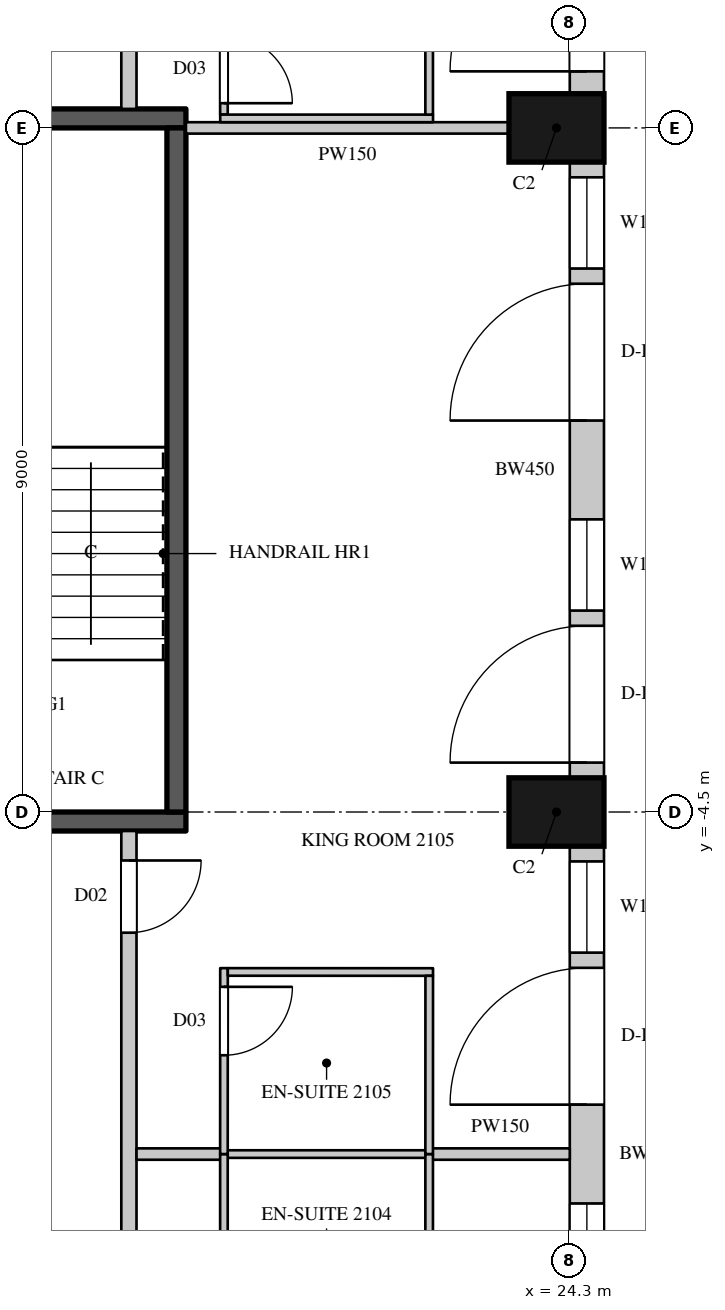
"""IFC4 building model, lengths in metres.
Left out: names, types, materials, properties, quantities, classifications, styles, units other than length and angle.
Written with IfcOpenShell. Run it as: python <this file> out.ifc"""

import sys

from ifc_helpers import new_model, si_unit, direction, frame, frame_2d, origin, origin_2d, place, context, subcontext, project, spatial, rectangle, extrude, element, fill, save


model = new_model("IFC4")
c1 = context("Model", 3, precision=1e-05, world=origin(), true_north=direction((0.0, 1.0)))
c2 = subcontext(c1, "Body", "Model", "MODEL_VIEW")
j1 = project(units=[si_unit("LENGTHUNIT", "METRE"), si_unit("PLANEANGLEUNIT", "RADIAN")], contexts=[c1])
p1 = place(None, origin())
s1 = spatial("IfcSite", under=j1, at=p1, CompositionType="ELEMENT")
p2 = place(p1, origin())
s2 = spatial("IfcBuilding", under=s1, at=p2, CompositionType="ELEMENT")
p3 = place(p2, frame((0.0, 0.0, 105.9)))
s3 = spatial("IfcBuildingStorey", under=s2, at=p3, CompositionType="ELEMENT", Elevation=105.9)
for number, where, z_axis, x_axis in (
    (1, (24.125, -4.5, 0.0), (0.0, 0.0, 1.0), (0.0, 1.0, 0.0)),
    (2, (24.125, 4.5, 0.0), (0.0, 0.0, 1.0), (0.0, 1.0, 0.0)),
):
    element("IfcColumn", number, at=place(p3, frame(where, z_axis=z_axis, x_axis=x_axis)), inside=s3, PredefinedType="COLUMN", context=c2, shape_type="SweptSolid", body=[
        extrude(rectangle(XDim=0.9, YDim=1.25, at=origin_2d()), origin(), (0.0, 0.0, 1.0), 3.6),
    ])
p4 = place(p3, frame((24.525, -13.05, 0.0), z_axis=(0.0, 0.0, 1.0), x_axis=(0.0, 1.0, 0.0)))
e3 = element("IfcWall", 3, at=p4, inside=s3, PredefinedType="SOLIDWALL", context=c2, shape_type="SweptSolid", body=[
    extrude(rectangle(XDim=8.1, YDim=0.45, at=frame_2d((4.05, 0.0))), origin(), (0.0, 0.0, 1.0), 3.3),
])
p5 = place(p4, frame((0.2, 0.0, 0.0)))
e4 = element("IfcOpeningElement", 4, at=p5, cuts=e3, PredefinedType="OPENING", context=c2, shape_type="SweptSolid", body=[
    extrude(rectangle(XDim=1.8, YDim=2.4, at=frame_2d((0.9, 1.2))), frame((0.0, 0.235, 0.0), z_axis=(0.0, -1.0, 0.0), x_axis=(1.0, 0.0, 0.0)), (0.0, 0.0, 1.0), 0.47),
])
p6 = place(p4, frame((2.2, 0.0, 1.05)))
e5 = element("IfcOpeningElement", 5, at=p6, cuts=e3, PredefinedType="OPENING", context=c2, shape_type="SweptSolid", body=[
    extrude(rectangle(XDim=1.2, YDim=2.0, at=frame_2d((0.6, 1.0))), frame((0.0, 0.235, 0.0), z_axis=(0.0, -1.0, 0.0), x_axis=(1.0, 0.0, 0.0)), (0.0, 0.0, 1.0), 0.47),
])
p7 = place(p4, frame((4.7, 0.0, 0.0)))
e6 = element("IfcOpeningElement", 6, at=p7, cuts=e3, PredefinedType="OPENING", context=c2, shape_type="SweptSolid", body=[
    extrude(rectangle(XDim=1.8, YDim=2.4, at=frame_2d((0.9, 1.2))), frame((0.0, 0.235, 0.0), z_axis=(0.0, -1.0, 0.0), x_axis=(1.0, 0.0, 0.0)), (0.0, 0.0, 1.0), 0.47),
])
p8 = place(p4, frame((6.7, 0.0, 1.05)))
e7 = element("IfcOpeningElement", 7, at=p8, cuts=e3, PredefinedType="OPENING", context=c2, shape_type="SweptSolid", body=[
    extrude(rectangle(XDim=1.2, YDim=2.0, at=frame_2d((0.6, 1.0))), frame((0.0, 0.235, 0.0), z_axis=(0.0, -1.0, 0.0), x_axis=(1.0, 0.0, 0.0)), (0.0, 0.0, 1.0), 0.47),
])
p9 = place(p3, frame((24.525, -4.05, 0.0), z_axis=(0.0, 0.0, 1.0), x_axis=(0.0, 1.0, 0.0)))
e8 = element("IfcWall", 8, at=p9, inside=s3, PredefinedType="SOLIDWALL", context=c2, shape_type="SweptSolid", body=[
    extrude(rectangle(XDim=8.1, YDim=0.45, at=frame_2d((4.05, 0.0))), origin(), (0.0, 0.0, 1.0), 3.3),
])
p10 = place(p9, frame((0.2, 0.0, 0.0)))
e9 = element("IfcOpeningElement", 9, at=p10, cuts=e8, PredefinedType="OPENING", context=c2, shape_type="SweptSolid", body=[
    extrude(rectangle(XDim=1.8, YDim=2.4, at=frame_2d((0.9, 1.2))), frame((0.0, 0.235, 0.0), z_axis=(0.0, -1.0, 0.0), x_axis=(1.0, 0.0, 0.0)), (0.0, 0.0, 1.0), 0.47),
])
p11 = place(p9, frame((2.2, 0.0, 1.05)))
e10 = element("IfcOpeningElement", 10, at=p11, cuts=e8, PredefinedType="OPENING", context=c2, shape_type="SweptSolid", body=[
    extrude(rectangle(XDim=1.2, YDim=2.0, at=frame_2d((0.6, 1.0))), frame((0.0, 0.235, 0.0), z_axis=(0.0, -1.0, 0.0), x_axis=(1.0, 0.0, 0.0)), (0.0, 0.0, 1.0), 0.47),
])
p12 = place(p9, frame((4.7, 0.0, 0.0)))
e11 = element("IfcOpeningElement", 11, at=p12, cuts=e8, PredefinedType="OPENING", context=c2, shape_type="SweptSolid", body=[
    extrude(rectangle(XDim=1.8, YDim=2.4, at=frame_2d((0.9, 1.2))), frame((0.0, 0.235, 0.0), z_axis=(0.0, -1.0, 0.0), x_axis=(1.0, 0.0, 0.0)), (0.0, 0.0, 1.0), 0.47),
])
p13 = place(p9, frame((6.7, 0.0, 1.05)))
e12 = element("IfcOpeningElement", 12, at=p13, cuts=e8, PredefinedType="OPENING", context=c2, shape_type="SweptSolid", body=[
    extrude(rectangle(XDim=1.2, YDim=2.0, at=frame_2d((0.6, 1.0))), frame((0.0, 0.235, 0.0), z_axis=(0.0, -1.0, 0.0), x_axis=(1.0, 0.0, 0.0)), (0.0, 0.0, 1.0), 0.47),
])
p14 = place(p3, frame((24.525, 4.95, 0.0), z_axis=(0.0, 0.0, 1.0), x_axis=(0.0, 1.0, 0.0)))
e13 = element("IfcWall", 13, at=p14, inside=s3, PredefinedType="SOLIDWALL", context=c2, shape_type="SweptSolid", body=[
    extrude(rectangle(XDim=8.439, YDim=0.45, at=frame_2d((4.219, 0.0))), origin(), (0.0, 0.0, 1.0), 3.3),
])
p15 = place(p14, frame((0.294, 0.0, 0.0)))
e14 = element("IfcOpeningElement", 14, at=p15, cuts=e13, PredefinedType="OPENING", context=c2, shape_type="SweptSolid", body=[
    extrude(rectangle(XDim=1.8, YDim=2.4, at=frame_2d((0.9, 1.2))), frame((0.0, 0.235, 0.0), z_axis=(0.0, -1.0, 0.0), x_axis=(1.0, 0.0, 0.0)), (0.0, 0.0, 1.0), 0.47),
])
p16 = place(p14, frame((2.294, 0.0, 1.05)))
e15 = element("IfcOpeningElement", 15, at=p16, cuts=e13, PredefinedType="OPENING", context=c2, shape_type="SweptSolid", body=[
    extrude(rectangle(XDim=1.2, YDim=2.0, at=frame_2d((0.6, 1.0))), frame((0.0, 0.235, 0.0), z_axis=(0.0, -1.0, 0.0), x_axis=(1.0, 0.0, 0.0)), (0.0, 0.0, 1.0), 0.47),
])
p17 = place(p14, frame((5.232, 0.0, 1.05)))
e16 = element("IfcOpeningElement", 16, at=p17, cuts=e13, PredefinedType="OPENING", context=c2, shape_type="SweptSolid", body=[
    extrude(rectangle(XDim=2.7, YDim=2.0, at=frame_2d((1.35, 1.0))), frame((0.0, 0.235, 0.0), z_axis=(0.0, -1.0, 0.0), x_axis=(1.0, 0.0, 0.0)), (0.0, 0.0, 1.0), 0.47),
])
p18 = place(p3, frame((18.5, -18.938, 0.0), z_axis=(0.0, 0.0, 1.0), x_axis=(0.0, 1.0, 0.0)))
e17 = element("IfcWall", 17, at=p18, inside=s3, PredefinedType="PARTITIONING", context=c2, shape_type="SweptSolid", body=[
    extrude(rectangle(XDim=14.188, YDim=0.2, at=frame_2d((7.094, 0.0))), origin(), (0.0, 0.0, 1.0), 3.3),
])
p19 = place(p18, frame((3.45, 0.0, 0.0)))
e18 = element("IfcOpeningElement", 18, at=p19, cuts=e17, PredefinedType="OPENING", context=c2, shape_type="SweptSolid", body=[
    extrude(rectangle(XDim=0.95, YDim=2.2, at=frame_2d((0.475, 1.1))), frame((0.0, 0.11, 0.0), z_axis=(0.0, -1.0, 0.0), x_axis=(1.0, 0.0, 0.0)), (0.0, 0.0, 1.0), 0.22),
])
p20 = place(p18, frame((12.85, 0.0, 0.0)))
e19 = element("IfcOpeningElement", 19, at=p20, cuts=e17, PredefinedType="OPENING", context=c2, shape_type="SweptSolid", body=[
    extrude(rectangle(XDim=0.95, YDim=2.2, at=frame_2d((0.475, 1.1))), frame((0.0, 0.11, 0.0), z_axis=(0.0, -1.0, 0.0), x_axis=(1.0, 0.0, 0.0)), (0.0, 0.0, 1.0), 0.22),
])
p21 = place(p3, frame((18.5, 4.75, 0.0), z_axis=(0.0, 0.0, 1.0), x_axis=(0.0, 1.0, 0.0)))
e20 = element("IfcWall", 20, at=p21, inside=s3, PredefinedType="PARTITIONING", context=c2, shape_type="SweptSolid", body=[
    extrude(rectangle(XDim=14.434, YDim=0.2, at=frame_2d((7.217, 0.0))), origin(), (0.0, 0.0, 1.0), 3.3),
])
p22 = place(p21, frame((7.65, 0.0, 0.0)))
e21 = element("IfcOpeningElement", 21, at=p22, cuts=e20, PredefinedType="OPENING", context=c2, shape_type="SweptSolid", body=[
    extrude(rectangle(XDim=0.95, YDim=2.2, at=frame_2d((0.475, 1.1))), frame((0.0, 0.11, 0.0), z_axis=(0.0, -1.0, 0.0), x_axis=(1.0, 0.0, 0.0)), (0.0, 0.0, 1.0), 0.22),
])
p23 = place(p3, frame((18.6, -9.0, 0.0), z_axis=(0.0, 0.0, 1.0), x_axis=(1.0, 0.0, 0.0)))
e22 = element("IfcWall", 22, at=p23, inside=s3, PredefinedType="PARTITIONING", context=c2, shape_type="SweptSolid", body=[
    extrude(rectangle(XDim=1.13, YDim=0.15, at=frame_2d((0.565, 0.0))), origin(), (0.0, 0.0, 1.0), 2.65),
])
p24 = place(p3, frame((19.25, 4.5, 0.0), z_axis=(0.0, 0.0, 1.0), x_axis=(1.0, 0.0, 0.0)))
e23 = element("IfcWall", 23, at=p24, inside=s3, PredefinedType="PARTITIONING", context=c2, shape_type="SweptSolid", body=[
    extrude(rectangle(XDim=4.25, YDim=0.15, at=frame_2d((2.125, 0.0))), origin(), (0.0, 0.0, 1.0), 3.3),
])
p25 = place(p3, frame((22.47, -9.0, 0.0), z_axis=(0.0, 0.0, 1.0), x_axis=(1.0, 0.0, 0.0)))
e24 = element("IfcWall", 24, at=p25, inside=s3, PredefinedType="PARTITIONING", context=c2, shape_type="SweptSolid", body=[
    extrude(rectangle(XDim=1.83, YDim=0.15, at=frame_2d((0.915, 0.0))), origin(), (0.0, 0.0, 1.0), 2.65),
])
for number, where, z_axis, x_axis in (
    (25, (14.55, -4.625, 0.0), (0.0, 0.0, 1.0), (1.0, 0.0, 0.0)),
    (26, (14.55, 4.625, 0.0), (0.0, 0.0, 1.0), (1.0, 0.0, 0.0)),
):
    element("IfcWall", number, at=place(p3, frame(where, z_axis=z_axis, x_axis=x_axis)), inside=s3, PredefinedType="SHEAR", context=c2, shape_type="SweptSolid", body=[
        extrude(rectangle(XDim=4.7, YDim=0.25, at=frame_2d((2.35, 0.0))), origin(), (0.0, 0.0, 1.0), 3.3),
    ])
p26 = place(p3, frame((19.125, -4.5, 0.0), z_axis=(0.0, 0.0, 1.0), x_axis=(0.0, 1.0, 0.0)))
e27 = element("IfcWall", 27, at=p26, inside=s3, PredefinedType="SHEAR", context=c2, shape_type="SweptSolid", body=[
    extrude(rectangle(XDim=9.0, YDim=0.25, at=frame_2d((4.5, 0.0))), origin(), (0.0, 0.0, 1.0), 3.3),
])
p27 = place(p3, frame((19.73, -9.0, 0.0), z_axis=(0.0, 0.0, 1.0), x_axis=(1.0, 0.0, 0.0)))
e28 = element("IfcWall", 28, at=p27, inside=s3, PredefinedType="PARTITIONING", context=c2, shape_type="SweptSolid", body=[
    extrude(rectangle(XDim=2.74, YDim=0.1, at=frame_2d((1.37, 0.0))), origin(), (0.0, 0.0, 1.0), 2.65),
])
p28 = place(p3, frame((19.75, -11.346, 0.0), z_axis=(0.0, 0.0, 1.0), x_axis=(0.0, 1.0, 0.0)))
e29 = element("IfcWall", 29, at=p28, inside=s3, PredefinedType="PARTITIONING", context=c2, shape_type="SweptSolid", body=[
    extrude(rectangle(XDim=2.346, YDim=0.1, at=frame_2d((1.173, 0.0))), origin(), (0.0, 0.0, 1.0), 3.3),
])
p29 = place(p28, frame((0.15, 0.0, 0.0)))
e30 = element("IfcOpeningElement", 30, at=p29, cuts=e29, PredefinedType="OPENING", context=c2, shape_type="SweptSolid", body=[
    extrude(rectangle(XDim=0.9, YDim=2.2, at=frame_2d((0.45, 1.1))), frame((0.0, 0.06, 0.0), z_axis=(0.0, -1.0, 0.0), x_axis=(1.0, 0.0, 0.0)), (0.0, 0.0, 1.0), 0.12),
])
p30 = place(p3, frame((19.75, -9.0, 0.0), z_axis=(0.0, 0.0, 1.0), x_axis=(0.000399241409, 0.999999920303, 0.0)))
e31 = element("IfcWall", 31, at=p30, inside=s3, PredefinedType="PARTITIONING", context=c2, shape_type="SweptSolid", body=[
    extrude(rectangle(XDim=2.446, YDim=0.1, at=frame_2d((1.223, 0.0))), origin(), (0.0, 0.0, 1.0), 3.3),
])
p31 = place(p30, frame((1.3, 0.0, 0.0)))
e32 = element("IfcOpeningElement", 32, at=p31, cuts=e31, PredefinedType="OPENING", context=c2, shape_type="SweptSolid", body=[
    extrude(rectangle(XDim=0.9, YDim=2.2, at=frame_2d((0.45, 1.1))), frame((0.0, 0.06, 0.0), z_axis=(0.0, -1.0, 0.0), x_axis=(1.0, 0.0, 0.0)), (0.0, 0.0, 1.0), 0.12),
])
p32 = place(p3, frame((19.75, 4.675, 0.0), z_axis=(0.0, 0.0, 1.0), x_axis=(0.0, 1.0, 0.0)))
e33 = element("IfcWall", 33, at=p32, inside=s3, PredefinedType="PARTITIONING", context=c2, shape_type="SweptSolid", body=[
    extrude(rectangle(XDim=2.3, YDim=0.1, at=frame_2d((1.15, 0.0))), origin(), (0.0, 0.0, 1.0), 3.3),
])
p33 = place(p32, frame((0.15, 0.0, 0.0)))
e34 = element("IfcOpeningElement", 34, at=p33, cuts=e33, PredefinedType="OPENING", context=c2, shape_type="SweptSolid", body=[
    extrude(rectangle(XDim=0.9, YDim=2.2, at=frame_2d((0.45, 1.1))), frame((0.0, 0.06, 0.0), z_axis=(0.0, -1.0, 0.0), x_axis=(1.0, 0.0, 0.0)), (0.0, 0.0, 1.0), 0.12),
])
p34 = place(p3, frame((19.801, -6.604, 0.0), z_axis=(0.0, 0.0, 1.0), x_axis=(0.999999934588, -0.000361696332, 0.0)))
e35 = element("IfcWall", 35, at=p34, inside=s3, PredefinedType="PARTITIONING", context=c2, shape_type="SweptSolid", body=[
    extrude(rectangle(XDim=2.7, YDim=0.1, at=frame_2d((1.35, 0.0))), origin(), (0.0, 0.0, 1.0), 3.3),
])
p35 = place(p3, frame((19.701, 4.625, 0.0), z_axis=(0.0, 0.0, 1.0), x_axis=(1.0, 0.0, 0.0)))
e36 = element("IfcWall", 36, at=p35, inside=s3, PredefinedType="PARTITIONING", context=c2, shape_type="SweptSolid", body=[
    extrude(rectangle(XDim=2.8, YDim=0.1, at=frame_2d((1.4, 0.0))), origin(), (0.0, 0.0, 1.0), 3.3),
])
p36 = place(p3, frame((22.45, -11.346, 0.0), z_axis=(0.0, 0.0, 1.0), x_axis=(0.0, 1.0, 0.0)))
e37 = element("IfcWall", 37, at=p36, inside=s3, PredefinedType="PARTITIONING", context=c2, shape_type="SweptSolid", body=[
    extrude(rectangle(XDim=2.346, YDim=0.1, at=frame_2d((1.173, 0.0))), origin(), (0.0, 0.0, 1.0), 3.3),
])
p37 = place(p3, frame((22.45, -9.0, 0.0), z_axis=(0.0, 0.0, 1.0), x_axis=(0.00041644973, 0.999999913285, 0.0)))
e38 = element("IfcWall", 38, at=p37, inside=s3, PredefinedType="PARTITIONING", context=c2, shape_type="SweptSolid", body=[
    extrude(rectangle(XDim=2.345, YDim=0.1, at=frame_2d((1.172, 0.0))), origin(), (0.0, 0.0, 1.0), 3.3),
])
p38 = place(p3, frame((22.45, 4.675, 0.0), z_axis=(0.0, 0.0, 1.0), x_axis=(0.0, 1.0, 0.0)))
e39 = element("IfcWall", 39, at=p38, inside=s3, PredefinedType="PARTITIONING", context=c2, shape_type="SweptSolid", body=[
    extrude(rectangle(XDim=2.3, YDim=0.1, at=frame_2d((1.15, 0.0))), origin(), (0.0, 0.0, 1.0), 3.3),
])
p39 = place(p6, origin())
e40 = element("IfcWindow", 40, at=p39, inside=s3, PartitioningType="SINGLE_PANEL", PredefinedType="WINDOW", context=c2, shape_type="SweptSolid", body=[
    extrude(rectangle(XDim=1.2, YDim=2.0, at=frame_2d((0.6, 1.0))), frame((0.0, 0.135, 0.0), z_axis=(0.0, -1.0, 0.0), x_axis=(1.0, 0.0, 0.0)), (0.0, 0.0, 1.0), 0.06),
])
fill(e5, e40)
p40 = place(p7, origin())
e41 = element("IfcDoor", 41, at=p40, inside=s3, OperationType="SLIDING_TO_LEFT", PredefinedType="DOOR", context=c2, shape_type="SweptSolid", body=[
    extrude(rectangle(XDim=1.8, YDim=2.4, at=frame_2d((0.9, 1.2))), frame((0.0, 0.13, 0.0), z_axis=(0.0, -1.0, 0.0), x_axis=(1.0, 0.0, 0.0)), (0.0, 0.0, 1.0), 0.05),
])
fill(e6, e41)
p41 = place(p8, origin())
e42 = element("IfcWindow", 42, at=p41, inside=s3, PartitioningType="SINGLE_PANEL", PredefinedType="WINDOW", context=c2, shape_type="SweptSolid", body=[
    extrude(rectangle(XDim=1.2, YDim=2.0, at=frame_2d((0.6, 1.0))), frame((0.0, 0.135, 0.0), z_axis=(0.0, -1.0, 0.0), x_axis=(1.0, 0.0, 0.0)), (0.0, 0.0, 1.0), 0.06),
])
fill(e7, e42)
p42 = place(p10, origin())
e43 = element("IfcDoor", 43, at=p42, inside=s3, OperationType="SLIDING_TO_LEFT", PredefinedType="DOOR", context=c2, shape_type="SweptSolid", body=[
    extrude(rectangle(XDim=1.8, YDim=2.4, at=frame_2d((0.9, 1.2))), frame((0.0, 0.13, 0.0), z_axis=(0.0, -1.0, 0.0), x_axis=(1.0, 0.0, 0.0)), (0.0, 0.0, 1.0), 0.05),
])
fill(e9, e43)
p43 = place(p11, origin())
e44 = element("IfcWindow", 44, at=p43, inside=s3, PartitioningType="SINGLE_PANEL", PredefinedType="WINDOW", context=c2, shape_type="SweptSolid", body=[
    extrude(rectangle(XDim=1.2, YDim=2.0, at=frame_2d((0.6, 1.0))), frame((0.0, 0.135, 0.0), z_axis=(0.0, -1.0, 0.0), x_axis=(1.0, 0.0, 0.0)), (0.0, 0.0, 1.0), 0.06),
])
fill(e10, e44)
p44 = place(p12, origin())
e45 = element("IfcDoor", 45, at=p44, inside=s3, OperationType="SLIDING_TO_LEFT", PredefinedType="DOOR", context=c2, shape_type="SweptSolid", body=[
    extrude(rectangle(XDim=1.8, YDim=2.4, at=frame_2d((0.9, 1.2))), frame((0.0, 0.13, 0.0), z_axis=(0.0, -1.0, 0.0), x_axis=(1.0, 0.0, 0.0)), (0.0, 0.0, 1.0), 0.05),
])
fill(e11, e45)
p45 = place(p13, origin())
e46 = element("IfcWindow", 46, at=p45, inside=s3, PartitioningType="SINGLE_PANEL", PredefinedType="WINDOW", context=c2, shape_type="SweptSolid", body=[
    extrude(rectangle(XDim=1.2, YDim=2.0, at=frame_2d((0.6, 1.0))), frame((0.0, 0.135, 0.0), z_axis=(0.0, -1.0, 0.0), x_axis=(1.0, 0.0, 0.0)), (0.0, 0.0, 1.0), 0.06),
])
fill(e12, e46)
p46 = place(p15, origin())
e47 = element("IfcDoor", 47, at=p46, inside=s3, OperationType="SLIDING_TO_LEFT", PredefinedType="DOOR", context=c2, shape_type="SweptSolid", body=[
    extrude(rectangle(XDim=1.8, YDim=2.4, at=frame_2d((0.9, 1.2))), frame((0.0, 0.13, 0.0), z_axis=(0.0, -1.0, 0.0), x_axis=(1.0, 0.0, 0.0)), (0.0, 0.0, 1.0), 0.05),
])
fill(e14, e47)
p47 = place(p20, origin())
e48 = element("IfcDoor", 48, at=p47, inside=s3, OperationType="SINGLE_SWING_LEFT", PredefinedType="DOOR", context=c2, shape_type="SweptSolid", body=[
    extrude(rectangle(XDim=0.95, YDim=2.2, at=frame_2d((0.475, 1.1))), frame((0.0, 0.025, 0.0), z_axis=(0.0, -1.0, 0.0), x_axis=(1.0, 0.0, 0.0)), (0.0, 0.0, 1.0), 0.05),
])
fill(e19, e48)
p48 = place(p31, origin())
e49 = element("IfcDoor", 49, at=p48, inside=s3, OperationType="SINGLE_SWING_LEFT", PredefinedType="DOOR", context=c2, shape_type="SweptSolid", body=[
    extrude(rectangle(XDim=0.9, YDim=2.2, at=frame_2d((0.45, 1.1))), frame((0.0, 0.025, 0.0), z_axis=(0.0, -1.0, 0.0), x_axis=(1.0, 0.0, 0.0)), (0.0, 0.0, 1.0), 0.05),
])
fill(e32, e49)
p49 = place(p33, origin())
e50 = element("IfcDoor", 50, at=p49, inside=s3, OperationType="SINGLE_SWING_RIGHT", PredefinedType="DOOR", context=c2, shape_type="SweptSolid", body=[
    extrude(rectangle(XDim=0.9, YDim=2.2, at=frame_2d((0.45, 1.1))), frame((0.0, 0.025, 0.0), z_axis=(0.0, -1.0, 0.0), x_axis=(1.0, 0.0, 0.0)), (0.0, 0.0, 1.0), 0.05),
])
fill(e34, e50)
save(model, sys.argv[1])
